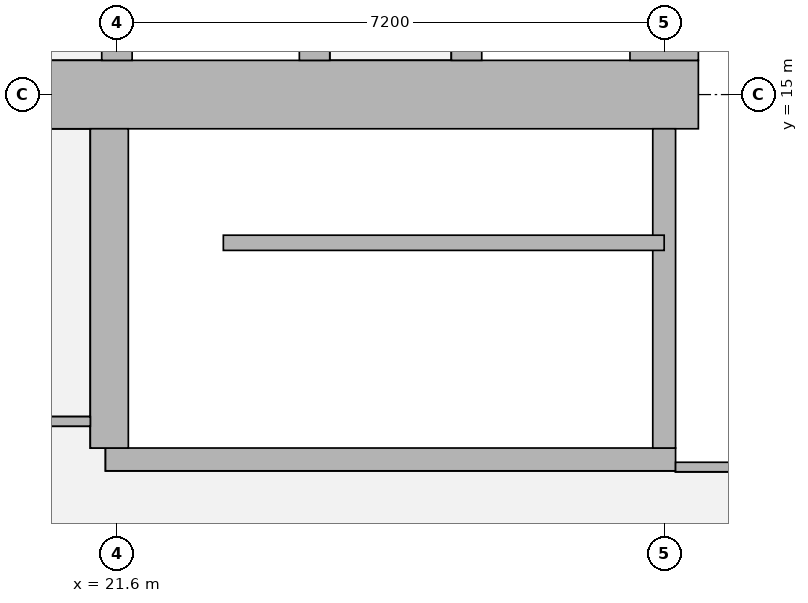
"""IFC4 building model, lengths in metres.
Left out: names, types, materials, properties, quantities, classifications, styles, units other than length and angle.
Written with IfcOpenShell. Run it as: python <this file> out.ifc"""

import sys

from ifc_helpers import new_model, si_unit, direction, frame, frame_2d, origin, place, context, subcontext, project, spatial, rectangle, extrude, element, fill, save


model = new_model("IFC4")
c1 = context("Model", 3, precision=1e-05, world=origin(), true_north=direction((0.0, 1.0)))
c2 = subcontext(c1, "Body", "Model", "MODEL_VIEW")
j1 = project(units=[si_unit("LENGTHUNIT", "METRE"), si_unit("PLANEANGLEUNIT", "RADIAN")], contexts=[c1])
p1 = place(None, origin())
s1 = spatial("IfcSite", under=j1, at=p1, CompositionType="ELEMENT")
p2 = place(p1, origin())
s2 = spatial("IfcBuilding", under=s1, at=p2, CompositionType="ELEMENT")
p3 = place(p2, frame((0.0, 0.0, 234.95)))
s3 = spatial("IfcBuildingStorey", under=s2, at=p3, CompositionType="ELEMENT", Elevation=234.95)
p4 = place(p3, frame((13.95, 15.0, 0.0), z_axis=(0.0, 0.0, 1.0), x_axis=(1.0, 0.0, 0.0)))
e1 = element("IfcWall", 1, at=p4, inside=s3, PredefinedType="SHEAR", context=c2, shape_type="SweptSolid", body=[
    extrude(rectangle(XDim=15.3, YDim=0.9, at=frame_2d((7.65, 0.0))), origin(), (0.0, 0.0, 1.0), 3.75),
])
p5 = place(p4, frame((4.45, 0.0, 0.0)))
e2 = element("IfcOpeningElement", 2, at=p5, cuts=e1, PredefinedType="OPENING", context=c2, shape_type="SweptSolid", body=[
    extrude(rectangle(XDim=1.8, YDim=2.1, at=frame_2d((0.9, 1.05))), frame((0.0, 0.46, 0.0), z_axis=(0.0, -1.0, 0.0), x_axis=(1.0, 0.0, 0.0)), (0.0, 0.0, 1.0), 0.92),
])
p6 = place(p4, frame((10.7, 0.0, 0.0)))
e3 = element("IfcOpeningElement", 3, at=p6, cuts=e1, PredefinedType="OPENING", context=c2, shape_type="SweptSolid", body=[
    extrude(rectangle(XDim=1.1, YDim=2.1, at=frame_2d((0.55, 1.05))), frame((0.0, 0.46, 0.0), z_axis=(0.0, -1.0, 0.0), x_axis=(1.0, 0.0, 0.0)), (0.0, 0.0, 1.0), 0.92),
])
p7 = place(p3, frame((28.8, 15.45, 0.0), z_axis=(0.0, 0.0, 1.0), x_axis=(0.0, 1.0, 0.0)))
e4 = element("IfcWall", 4, at=p7, inside=s3, PredefinedType="SHEAR", context=c2, shape_type="SweptSolid", body=[
    extrude(rectangle(XDim=14.1, YDim=0.9, at=frame_2d((7.05, 0.0))), origin(), (0.0, 0.0, 1.0), 3.75),
])
p8 = place(p3, frame((21.6, 15.45, 0.0), z_axis=(0.0, 0.0, 1.0), x_axis=(0.0, 1.0, 0.0)))
e5 = element("IfcWall", 5, at=p8, inside=s3, PredefinedType="SHEAR", context=c2, shape_type="SweptSolid", body=[
    extrude(rectangle(XDim=14.1, YDim=0.4, at=frame_2d((7.05, 0.0))), origin(), (0.0, 0.0, 1.0), 3.75),
])
p9 = place(p8, frame((0.875, 0.0, 0.0)))
e6 = element("IfcOpeningElement", 6, at=p9, cuts=e5, PredefinedType="OPENING", context=c2, shape_type="SweptSolid", body=[
    extrude(rectangle(XDim=1.1, YDim=2.1, at=frame_2d((0.55, 1.05))), frame((0.0, 0.21, 0.0), z_axis=(0.0, -1.0, 0.0), x_axis=(1.0, 0.0, 0.0)), (0.0, 0.0, 1.0), 0.42),
])
p10 = place(p8, frame((4.625, 0.0, 0.0)))
e7 = element("IfcOpeningElement", 7, at=p10, cuts=e5, PredefinedType="OPENING", context=c2, shape_type="SweptSolid", body=[
    extrude(rectangle(XDim=1.1, YDim=2.1, at=frame_2d((0.55, 1.05))), frame((0.0, 0.21, 0.0), z_axis=(0.0, -1.0, 0.0), x_axis=(1.0, 0.0, 0.0)), (0.0, 0.0, 1.0), 0.42),
])
p11 = place(p8, frame((8.375, 0.0, 0.0)))
e8 = element("IfcOpeningElement", 8, at=p11, cuts=e5, PredefinedType="OPENING", context=c2, shape_type="SweptSolid", body=[
    extrude(rectangle(XDim=1.1, YDim=2.1, at=frame_2d((0.55, 1.05))), frame((0.0, 0.21, 0.0), z_axis=(0.0, -1.0, 0.0), x_axis=(1.0, 0.0, 0.0)), (0.0, 0.0, 1.0), 0.42),
])
p12 = place(p8, frame((12.125, 0.0, 0.0)))
e9 = element("IfcOpeningElement", 9, at=p12, cuts=e5, PredefinedType="OPENING", context=c2, shape_type="SweptSolid", body=[
    extrude(rectangle(XDim=1.1, YDim=2.1, at=frame_2d((0.55, 1.05))), frame((0.0, 0.21, 0.0), z_axis=(0.0, -1.0, 0.0), x_axis=(1.0, 0.0, 0.0)), (0.0, 0.0, 1.0), 0.42),
])
p13 = place(p3, frame((24.2, 15.45, 0.0), z_axis=(0.0, 0.0, 1.0), x_axis=(0.0, 1.0, 0.0)))
e10 = element("IfcWall", 10, at=p13, inside=s3, PredefinedType="SHEAR", context=c2, shape_type="SweptSolid", body=[
    extrude(rectangle(XDim=14.1, YDim=0.4, at=frame_2d((7.05, 0.0))), origin(), (0.0, 0.0, 1.0), 3.75),
])
p14 = place(p3, frame((26.2, 15.45, 0.0), z_axis=(0.0, 0.0, 1.0), x_axis=(0.0, 1.0, 0.0)))
e11 = element("IfcWall", 11, at=p14, inside=s3, PredefinedType="SHEAR", context=c2, shape_type="SweptSolid", body=[
    extrude(rectangle(XDim=3.1, YDim=0.4, at=frame_2d((1.55, 0.0))), origin(), (0.0, 0.0, 1.0), 3.75),
])
p15 = place(p14, frame((0.825, 0.0, 0.0)))
e12 = element("IfcOpeningElement", 12, at=p15, cuts=e11, PredefinedType="OPENING", context=c2, shape_type="SweptSolid", body=[
    extrude(rectangle(XDim=1.2, YDim=2.1, at=frame_2d((0.6, 1.05))), frame((0.0, 0.21, 0.0), z_axis=(0.0, -1.0, 0.0), x_axis=(1.0, 0.0, 0.0)), (0.0, 0.0, 1.0), 0.42),
])
p16 = place(p3, frame((21.45, 10.2, 0.0), z_axis=(0.0, 0.0, 1.0), x_axis=(1.0, 0.0, 0.0)))
e13 = element("IfcWall", 13, at=p16, inside=s3, PredefinedType="SHEAR", context=c2, shape_type="SweptSolid", body=[
    extrude(rectangle(XDim=7.5, YDim=0.3, at=frame_2d((3.75, 0.0))), origin(), (0.0, 0.0, 1.0), 3.75),
])
p17 = place(p16, frame((0.5, 0.0, 0.0)))
e14 = element("IfcOpeningElement", 14, at=p17, cuts=e13, PredefinedType="OPENING", context=c2, shape_type="SweptSolid", body=[
    extrude(rectangle(XDim=1.1, YDim=2.1, at=frame_2d((0.55, 1.05))), frame((0.0, 0.16, 0.0), z_axis=(0.0, -1.0, 0.0), x_axis=(1.0, 0.0, 0.0)), (0.0, 0.0, 1.0), 0.32),
])
p18 = place(p3, frame((21.5, 10.35, 0.0), z_axis=(0.0, 0.0, 1.0), x_axis=(0.0, 1.0, 0.0)))
e15 = element("IfcWall", 15, at=p18, inside=s3, PredefinedType="SHEAR", context=c2, shape_type="SweptSolid", body=[
    extrude(rectangle(XDim=4.2, YDim=0.5, at=frame_2d((2.1, 0.0))), origin(), (0.0, 0.0, 1.0), 3.75),
])
p19 = place(p3, frame((28.8, 10.35, 0.0), z_axis=(0.0, 0.0, 1.0), x_axis=(0.0, 1.0, 0.0)))
e16 = element("IfcWall", 16, at=p19, inside=s3, PredefinedType="SHEAR", context=c2, shape_type="SweptSolid", body=[
    extrude(rectangle(XDim=4.2, YDim=0.3, at=frame_2d((2.1, 0.0))), origin(), (0.0, 0.0, 1.0), 3.75),
])
p20 = place(p3, frame((13.75, 10.7, 0.0), z_axis=(0.0, 0.0, 1.0), x_axis=(1.0, 0.0, 0.0)))
e17 = element("IfcWall", 17, at=p20, inside=s3, PredefinedType="PARTITIONING", context=c2, shape_type="SweptSolid", body=[
    extrude(rectangle(XDim=7.5, YDim=0.125, at=frame_2d((3.75, 0.0))), origin(), (0.0, 0.0, 1.0), 3.5),
])
p21 = place(p20, frame((4.245, 0.0, 0.0)))
e18 = element("IfcOpeningElement", 18, at=p21, cuts=e17, PredefinedType="OPENING", context=c2, shape_type="SweptSolid", body=[
    extrude(rectangle(XDim=1.8, YDim=2.1, at=frame_2d((0.9, 1.05))), frame((0.0, 0.073, 0.0), z_axis=(0.0, -1.0, 0.0), x_axis=(1.0, 0.0, 0.0)), (0.0, 0.0, 1.0), 0.145),
])
p22 = place(p3, frame((28.95, 10.1, 0.0), z_axis=(0.0, 0.0, 1.0), x_axis=(1.0, 0.0, 0.0)))
e19 = element("IfcWall", 19, at=p22, inside=s3, PredefinedType="PARTITIONING", context=c2, shape_type="SweptSolid", body=[
    extrude(rectangle(XDim=9.188, YDim=0.125, at=frame_2d((4.594, 0.0))), origin(), (0.0, 0.0, 1.0), 3.5),
])
p23 = place(p3, frame((23.0, 13.05, 0.0), z_axis=(0.0, 0.0, 1.0), x_axis=(1.0, 0.0, 0.0)))
e20 = element("IfcWall", 20, at=p23, inside=s3, PredefinedType="SHEAR", context=c2, shape_type="SweptSolid", body=[
    extrude(rectangle(XDim=5.8, YDim=0.2, at=frame_2d((2.9, 0.0))), origin(), (0.0, 0.0, 1.0), 3.75),
])
p24 = place(p6, origin())
e21 = element("IfcDoor", 21, at=p24, inside=s3, OperationType="SINGLE_SWING_LEFT", PredefinedType="DOOR", context=c2, shape_type="SweptSolid", body=[
    extrude(rectangle(XDim=1.1, YDim=2.1, at=frame_2d((0.55, 1.05))), frame((0.0, 0.025, 0.0), z_axis=(0.0, -1.0, 0.0), x_axis=(1.0, 0.0, 0.0)), (0.0, 0.0, 1.0), 0.05),
])
fill(e3, e21)
p25 = place(p17, origin())
e22 = element("IfcDoor", 22, at=p25, inside=s3, OperationType="SINGLE_SWING_LEFT", PredefinedType="DOOR", context=c2, shape_type="SweptSolid", body=[
    extrude(rectangle(XDim=1.1, YDim=2.1, at=frame_2d((0.55, 1.05))), frame((0.0, 0.025, 0.0), z_axis=(0.0, -1.0, 0.0), x_axis=(1.0, 0.0, 0.0)), (0.0, 0.0, 1.0), 0.05),
])
fill(e14, e22)
save(model, sys.argv[1])
